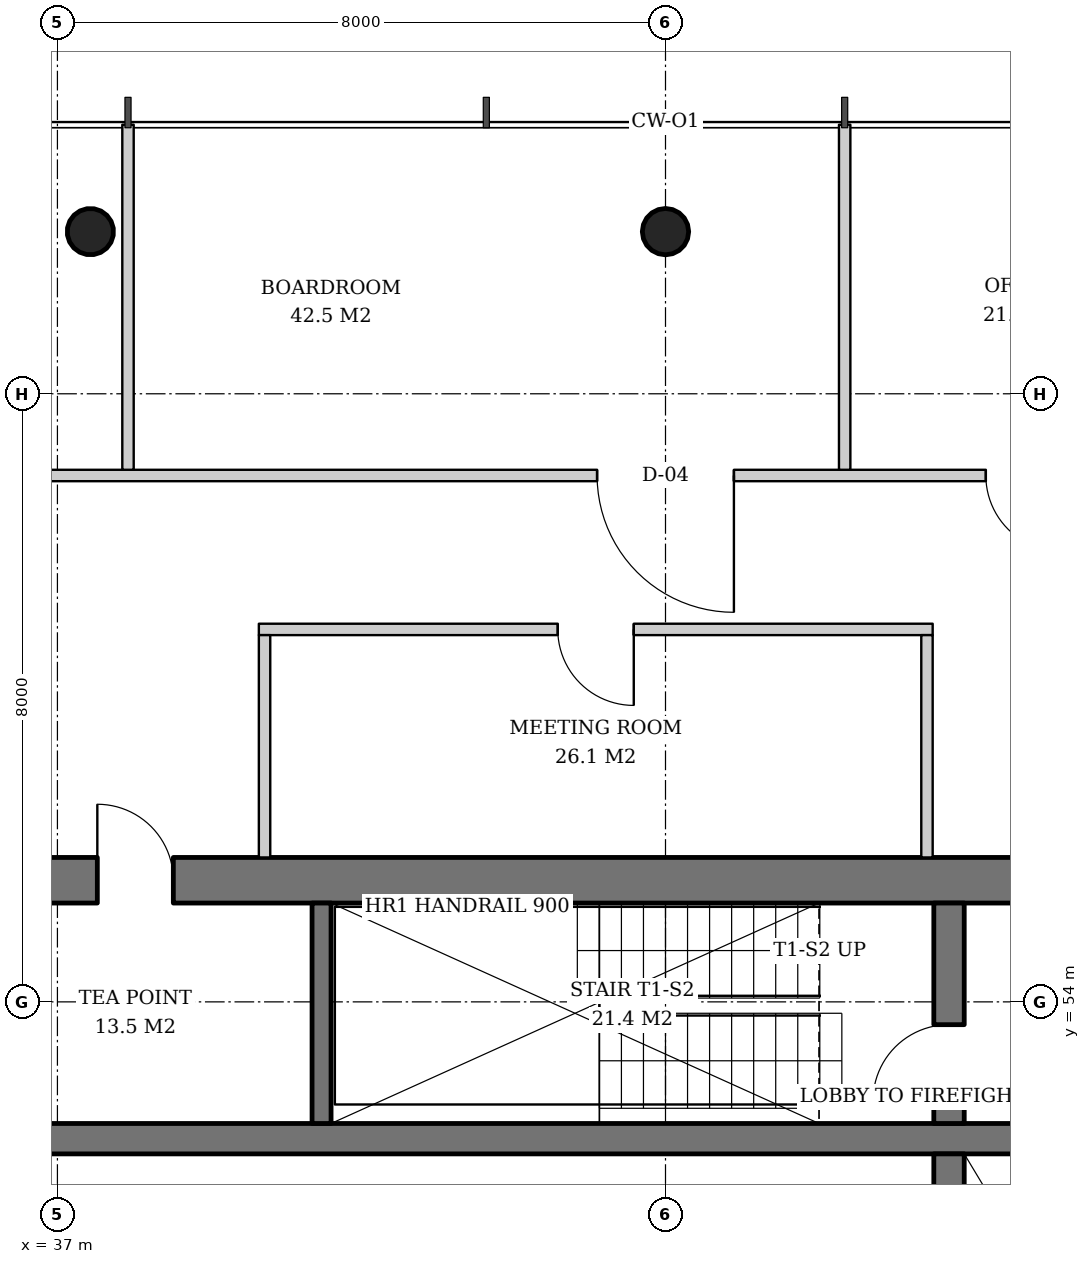
"""IFC4 building model, lengths in metres.
Left out: names, types, materials, properties, quantities, classifications, styles, units other than length and angle.
Written with IfcOpenShell. Run it as: python <this file> out.ifc"""

import sys

from ifc_helpers import new_model, si_unit, direction, frame, frame_2d, origin, origin_2d, place, context, subcontext, project, spatial, rectangle, hollow_circle, extrude, element, fill, save


model = new_model("IFC4")
c1 = context("Model", 3, precision=1e-05, world=origin(), true_north=direction((0.0, 1.0)))
c2 = subcontext(c1, "Body", "Model", "MODEL_VIEW")
j1 = project(units=[si_unit("LENGTHUNIT", "METRE"), si_unit("PLANEANGLEUNIT", "RADIAN")], contexts=[c1])
p1 = place(None, origin())
s1 = spatial("IfcSite", under=j1, at=p1, CompositionType="ELEMENT")
p2 = place(p1, origin())
s2 = spatial("IfcBuilding", under=s1, at=p2, CompositionType="ELEMENT")
p3 = place(p2, frame((0.0, 0.0, 203.4)))
s3 = spatial("IfcBuildingStorey", under=s2, at=p3, CompositionType="ELEMENT", Elevation=203.4)
p4 = place(p3, frame((45.0, 64.171, 0.0), z_axis=(0.0, -0.031914348339, 0.999490607445), x_axis=(1.0, 0.0, 0.0)))
e1 = element("IfcColumn", 1, at=p4, inside=s3, PredefinedType="COLUMN", context=c2, shape_type="SweptSolid", body=[
    extrude(hollow_circle(Radius=0.305, WallThickness=0.025, at=origin_2d()), origin(), (0.0, 0.0, 1.0), 3.802),
])
p5 = place(p3, frame((37.414, 64.171, 0.0), z_axis=(0.015987237665, -0.031910269556, 0.999362868496), x_axis=(0.894067115991, 0.447933021895, 0.0)))
e2 = element("IfcColumn", 2, at=p5, inside=s3, PredefinedType="COLUMN", context=c2, shape_type="SweptSolid", body=[
    extrude(hollow_circle(Radius=0.305, WallThickness=0.025, at=origin_2d()), origin(), (0.0, 0.0, 1.0), 3.802),
])
p6 = place(p3, frame((35.1, 55.6, 0.0), z_axis=(0.0, 0.0, 1.0), x_axis=(1.0, 0.0, 0.0)))
e3 = element("IfcWall", 3, at=p6, inside=s3, PredefinedType="SHEAR", context=c2, shape_type="SweptSolid", body=[
    extrude(rectangle(XDim=19.8, YDim=0.6, at=frame_2d((9.9, 0.0))), origin(), (0.0, 0.0, 1.0), 3.8),
])
p7 = place(p6, frame((14.54, 0.0, 0.0)))
e4 = element("IfcOpeningElement", 4, at=p7, cuts=e3, PredefinedType="OPENING", context=c2, shape_type="SweptSolid", body=[
    extrude(rectangle(XDim=1.0, YDim=2.1, at=frame_2d((0.5, 1.05))), frame((0.0, 0.31, 0.0), z_axis=(0.0, -1.0, 0.0), x_axis=(1.0, 0.0, 0.0)), (0.0, 0.0, 1.0), 0.62),
])
p8 = place(p6, frame((2.425, 0.0, 0.0)))
e5 = element("IfcOpeningElement", 5, at=p8, cuts=e3, PredefinedType="OPENING", context=c2, shape_type="SweptSolid", body=[
    extrude(rectangle(XDim=1.0, YDim=2.1, at=frame_2d((0.5, 1.05))), frame((0.0, 0.31, 0.0), z_axis=(0.0, -1.0, 0.0), x_axis=(1.0, 0.0, 0.0)), (0.0, 0.0, 1.0), 0.62),
])
p9 = place(p3, frame((35.7, 52.2, 0.0), z_axis=(0.0, 0.0, 1.0), x_axis=(1.0, 0.0, 0.0)))
e6 = element("IfcWall", 6, at=p9, inside=s3, PredefinedType="SHEAR", context=c2, shape_type="SweptSolid", body=[
    extrude(rectangle(XDim=18.6, YDim=0.4, at=frame_2d((9.3, 0.0))), origin(), (0.0, 0.0, 1.0), 3.8),
])
p10 = place(p3, frame((48.73, 40.0, 0.0), z_axis=(0.0, 0.0, 1.0), x_axis=(0.0, 1.0, 0.0)))
e7 = element("IfcWall", 7, at=p10, inside=s3, PredefinedType="SHEAR", context=c2, shape_type="SweptSolid", body=[
    extrude(rectangle(XDim=12.0, YDim=0.4, at=frame_2d((6.0, 0.0))), origin(), (0.0, 0.0, 1.0), 3.8),
])
p11 = place(p3, frame((48.73, 52.4, 0.0), z_axis=(0.0, 0.0, 1.0), x_axis=(0.0, 1.0, 0.0)))
e8 = element("IfcWall", 8, at=p11, inside=s3, PredefinedType="SHEAR", context=c2, shape_type="SweptSolid", body=[
    extrude(rectangle(XDim=2.9, YDim=0.4, at=frame_2d((1.45, 0.0))), origin(), (0.0, 0.0, 1.0), 3.8),
])
p12 = place(p11, frame((0.3, 0.0, 0.0)))
e9 = element("IfcOpeningElement", 9, at=p12, cuts=e8, PredefinedType="OPENING", context=c2, shape_type="SweptSolid", body=[
    extrude(rectangle(XDim=1.0, YDim=2.1, at=frame_2d((0.5, 1.05))), frame((0.0, 0.21, 0.0), z_axis=(0.0, -1.0, 0.0), x_axis=(1.0, 0.0, 0.0)), (0.0, 0.0, 1.0), 0.42),
])
p13 = place(p3, frame((40.475, 52.4, 0.0), z_axis=(0.0, 0.0, 1.0), x_axis=(0.0, 1.0, 0.0)))
e10 = element("IfcWall", 10, at=p13, inside=s3, PredefinedType="SHEAR", context=c2, shape_type="SweptSolid", body=[
    extrude(rectangle(XDim=2.9, YDim=0.25, at=frame_2d((1.45, 0.0))), origin(), (0.0, 0.0, 1.0), 3.8),
])
p14 = place(p3, frame((48.515, 58.9, 0.0), z_axis=(0.0, 0.0, 1.0), x_axis=(-1.0, 0.0, 0.0)))
e11 = element("IfcWall", 11, at=p14, inside=s3, PredefinedType="PARTITIONING", context=c2, shape_type="SweptSolid", body=[
    extrude(rectangle(XDim=8.865, YDim=0.15, at=frame_2d((4.433, 0.0))), origin(), (0.0, 0.0, 1.0), 2.867),
])
p15 = place(p14, frame((3.933, 0.0, 0.0)))
e12 = element("IfcOpeningElement", 12, at=p15, cuts=e11, PredefinedType="OPENING", context=c2, shape_type="SweptSolid", body=[
    extrude(rectangle(XDim=1.0, YDim=2.1, at=frame_2d((0.5, 1.05))), frame((0.0, 0.085, 0.0), z_axis=(0.0, -1.0, 0.0), x_axis=(1.0, 0.0, 0.0)), (0.0, 0.0, 1.0), 0.17),
])
for number, where, z_axis, x_axis in (
    (13, (48.44, 55.9, 0.0), (0.0, 0.0, 1.0), (0.0, 1.0, 0.0)),
    (14, (39.725, 55.9, 0.0), (0.0, 0.0, 1.0), (0.0, 1.0, 0.0)),
):
    element("IfcWall", number, at=place(p3, frame(where, z_axis=z_axis, x_axis=x_axis)), inside=s3, PredefinedType="PARTITIONING", context=c2, shape_type="SweptSolid", body=[
        extrude(rectangle(XDim=2.925, YDim=0.15, at=frame_2d((1.462, 0.0))), origin(), (0.0, 0.0, 1.0), 3.62),
    ])
p16 = place(p3, frame((58.436, 60.925, 0.0), z_axis=(0.0, 0.0, 1.0), x_axis=(-1.0, 0.0, 0.0)))
e15 = element("IfcWall", 15, at=p16, inside=s3, PredefinedType="PARTITIONING", context=c2, shape_type="SweptSolid", body=[
    extrude(rectangle(XDim=26.872, YDim=0.15, at=frame_2d((13.436, 0.0))), origin(), (0.0, 0.0, 1.0), 2.867),
])
p17 = place(p16, frame((3.507, 0.0, 0.0)))
e16 = element("IfcOpeningElement", 16, at=p17, cuts=e15, PredefinedType="OPENING", context=c2, shape_type="SweptSolid", body=[
    extrude(rectangle(XDim=1.0, YDim=2.1, at=frame_2d((0.5, 1.05))), frame((0.0, 0.085, 0.0), z_axis=(0.0, -1.0, 0.0), x_axis=(1.0, 0.0, 0.0)), (0.0, 0.0, 1.0), 0.17),
])
p18 = place(p16, frame((8.221, 0.0, 0.0)))
e17 = element("IfcOpeningElement", 17, at=p18, cuts=e15, PredefinedType="OPENING", context=c2, shape_type="SweptSolid", body=[
    extrude(rectangle(XDim=1.0, YDim=2.1, at=frame_2d((0.5, 1.05))), frame((0.0, 0.085, 0.0), z_axis=(0.0, -1.0, 0.0), x_axis=(1.0, 0.0, 0.0)), (0.0, 0.0, 1.0), 0.17),
])
p19 = place(p16, frame((12.536, 0.0, 0.0)))
e18 = element("IfcOpeningElement", 18, at=p19, cuts=e15, PredefinedType="OPENING", context=c2, shape_type="SweptSolid", body=[
    extrude(rectangle(XDim=1.8, YDim=2.4, at=frame_2d((0.9, 1.2))), frame((0.0, 0.085, 0.0), z_axis=(0.0, -1.0, 0.0), x_axis=(1.0, 0.0, 0.0)), (0.0, 0.0, 1.0), 0.17),
])
p20 = place(p16, frame((22.364, 0.0, 0.0)))
e19 = element("IfcOpeningElement", 19, at=p20, cuts=e15, PredefinedType="OPENING", context=c2, shape_type="SweptSolid", body=[
    extrude(rectangle(XDim=1.0, YDim=2.1, at=frame_2d((0.5, 1.05))), frame((0.0, 0.085, 0.0), z_axis=(0.0, -1.0, 0.0), x_axis=(1.0, 0.0, 0.0)), (0.0, 0.0, 1.0), 0.17),
])
for number, where, z_axis, x_axis in (
    (20, (47.357, 61.0, 0.0), (0.0, 0.0, 1.0), (0.0, 1.0, 0.0)),
    (21, (37.928, 61.0, 0.0), (0.0, 0.0, 1.0), (0.0, 1.0, 0.0)),
):
    element("IfcWall", number, at=place(p3, frame(where, z_axis=z_axis, x_axis=x_axis)), inside=s3, PredefinedType="PARTITIONING", context=c2, shape_type="SweptSolid", body=[
        extrude(rectangle(XDim=4.54, YDim=0.15, at=frame_2d((2.27, 0.0))), origin(), (0.0, 0.0, 1.0), 3.12),
    ])
p21 = place(p12, origin())
e22 = element("IfcDoor", 22, at=p21, inside=s3, OperationType="SINGLE_SWING_LEFT", PredefinedType="DOOR", context=c2, shape_type="SweptSolid", body=[
    extrude(rectangle(XDim=1.0, YDim=2.1, at=frame_2d((0.5, 1.05))), frame((0.0, 0.025, 0.0), z_axis=(0.0, -1.0, 0.0), x_axis=(1.0, 0.0, 0.0)), (0.0, 0.0, 1.0), 0.05),
])
fill(e9, e22)
p22 = place(p8, origin())
e23 = element("IfcDoor", 23, at=p22, inside=s3, OperationType="SINGLE_SWING_LEFT", PredefinedType="DOOR", context=c2, shape_type="SweptSolid", body=[
    extrude(rectangle(XDim=1.0, YDim=2.1, at=frame_2d((0.5, 1.05))), frame((0.0, -0.24, 0.0), z_axis=(0.0, -1.0, 0.0), x_axis=(1.0, 0.0, 0.0)), (0.0, 0.0, 1.0), 0.05),
])
fill(e5, e23)
p23 = place(p15, origin())
e24 = element("IfcDoor", 24, at=p23, inside=s3, OperationType="SINGLE_SWING_LEFT", PredefinedType="DOOR", context=c2, shape_type="SweptSolid", body=[
    extrude(rectangle(XDim=1.0, YDim=2.1, at=frame_2d((0.5, 1.05))), frame((0.0, 0.025, 0.0), z_axis=(0.0, -1.0, 0.0), x_axis=(1.0, 0.0, 0.0)), (0.0, 0.0, 1.0), 0.05),
])
fill(e12, e24)
p24 = place(p18, origin())
e25 = element("IfcDoor", 25, at=p24, inside=s3, OperationType="SINGLE_SWING_LEFT", PredefinedType="DOOR", context=c2, shape_type="SweptSolid", body=[
    extrude(rectangle(XDim=1.0, YDim=2.1, at=frame_2d((0.5, 1.05))), frame((0.0, 0.025, 0.0), z_axis=(0.0, -1.0, 0.0), x_axis=(1.0, 0.0, 0.0)), (0.0, 0.0, 1.0), 0.05),
])
fill(e17, e25)
p25 = place(p19, origin())
e26 = element("IfcDoor", 26, at=p25, inside=s3, OperationType="DOUBLE_DOOR_SINGLE_SWING", PredefinedType="DOOR", context=c2, shape_type="SweptSolid", body=[
    extrude(rectangle(XDim=1.8, YDim=2.4, at=frame_2d((0.9, 1.2))), frame((0.0, 0.025, 0.0), z_axis=(0.0, -1.0, 0.0), x_axis=(1.0, 0.0, 0.0)), (0.0, 0.0, 1.0), 0.05),
])
fill(e18, e26)
save(model, sys.argv[1])
